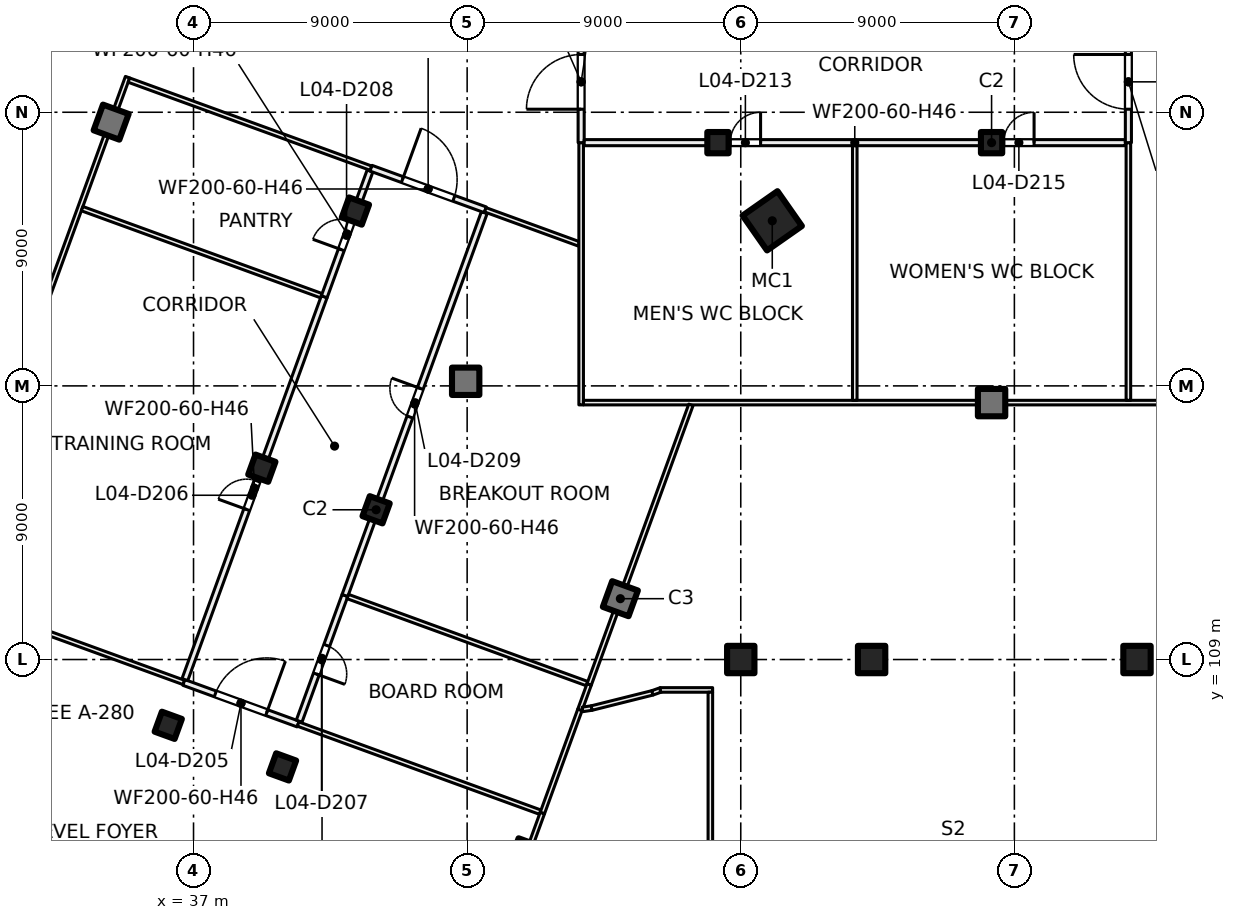
"""IFC4 building model, lengths in metres.
Left out: names, types, materials, properties, quantities, classifications, styles, units other than length and angle.
Written with IfcOpenShell. Run it as: python <this file> out.ifc"""

import sys

from ifc_helpers import new_model, si_unit, direction, frame, frame_2d, origin, origin_2d, place, context, subcontext, project, spatial, rectangle, hollow_rectangle, extrude, element, fill, save


model = new_model("IFC4")
c1 = context("Model", 3, precision=1e-05, world=origin(), true_north=direction((0.0, 1.0)))
c2 = subcontext(c1, "Body", "Model", "MODEL_VIEW")
j1 = project(units=[si_unit("LENGTHUNIT", "METRE"), si_unit("PLANEANGLEUNIT", "RADIAN")], contexts=[c1])
p1 = place(None, origin())
s1 = spatial("IfcSite", under=j1, at=p1, CompositionType="ELEMENT")
p2 = place(p1, origin())
s2 = spatial("IfcBuilding", under=s1, at=p2, CompositionType="ELEMENT")
p3 = place(p2, frame((0.0, 0.0, 22.5)))
s3 = spatial("IfcBuildingStorey", under=s2, at=p3, CompositionType="ELEMENT", Elevation=22.5)
for number, where, z_axis, x_axis in (
    (1, (55.0, 109.0, 0.0), (0.0, 0.0, 1.0), (1.0, 0.0, 0.0)),
    (2, (59.304, 109.0, 0.0), (0.0, 0.0, 1.0), (1.0, 0.0, 0.0)),
    (3, (68.033, 109.0, 0.0), (0.0, 0.0, 1.0), (1.0, 0.0, 0.0)),
):
    element("IfcColumn", number, at=place(p3, frame(where, z_axis=z_axis, x_axis=x_axis)), inside=s3, PredefinedType="COLUMN", context=c2, shape_type="SweptSolid", body=[
        extrude(rectangle(XDim=0.9, YDim=0.9, at=origin_2d()), origin(), (0.0, 0.0, 1.0), 5.0),
    ])
p4 = place(p3, frame((56.036, 123.43, 0.0), z_axis=(0.0, 0.0, 1.0), x_axis=(0.573576436351, -0.819152044289, 0.0)))
e4 = element("IfcColumn", 4, at=p4, inside=s3, PredefinedType="COLUMN", context=c2, shape_type="SweptSolid", body=[
    extrude(hollow_rectangle(XDim=1.4, YDim=1.4, WallThickness=0.04, at=origin_2d()), origin(), (0.0, 0.0, 1.0), 5.0),
])
for number, where, z_axis, x_axis in (
    (5, (54.25, 126.0, 0.0), (0.0, 0.0, 1.0), (1.0, 0.0, 0.0)),
    (6, (63.25, 126.0, 0.0), (0.0, 0.0, 1.0), (1.0, 0.0, 0.0)),
):
    element("IfcColumn", number, at=place(p3, frame(where, z_axis=z_axis, x_axis=x_axis)), inside=s3, PredefinedType="COLUMN", context=c2, shape_type="SweptSolid", body=[
        extrude(rectangle(XDim=0.7, YDim=0.7, at=origin_2d()), origin(), (0.0, 0.0, 1.0), 5.0),
    ])
for number, where, z_axis, x_axis in (
    (7, (45.952, 118.152, 0.0), (0.0, 0.0, 1.0), (1.0, 0.0, 0.0)),
    (8, (63.25, 117.45, 0.0), (0.0, 0.0, 1.0), (1.0, 0.0, 0.0)),
):
    element("IfcColumn", number, at=place(p3, frame(where, z_axis=z_axis, x_axis=x_axis)), inside=s3, PredefinedType="COLUMN", context=c2, shape_type="SweptSolid", body=[
        extrude(rectangle(XDim=0.9, YDim=0.9, at=origin_2d()), origin(), (0.0, 0.0, 1.0), 5.0),
    ])
for number, where, z_axis, x_axis in (
    (9, (43.006, 113.925, 0.0), (0.0, 0.0, 1.0), (-0.342, -0.94, 0.0)),
    (10, (39.927, 105.468, 0.0), (0.0, 0.0, 1.0), (-0.342, -0.94, 0.0)),
    (11, (42.325, 123.751, 0.0), (0.0, 0.0, 1.0), (-0.342, -0.94, 0.0)),
    (12, (39.247, 115.293, 0.0), (0.0, 0.0, 1.0), (-0.342, -0.94, 0.0)),
    (13, (36.169, 106.836, 0.0), (0.0, 0.0, 1.0), (-0.342, -0.94, 0.0)),
):
    element("IfcColumn", number, at=place(p3, frame(where, z_axis=z_axis, x_axis=x_axis)), inside=s3, PredefinedType="COLUMN", context=c2, shape_type="SweptSolid", body=[
        extrude(rectangle(XDim=0.7, YDim=0.7, at=origin_2d()), origin(), (0.0, 0.0, 1.0), 5.0),
    ])
for number, where, z_axis, x_axis in (
    (14, (51.04, 111.001, 0.0), (0.0, 0.0, 1.0), (-0.342, -0.94, 0.0)),
    (15, (47.962, 102.544, 0.0), (0.0, 0.0, 1.0), (-0.342, -0.94, 0.0)),
    (16, (34.291, 126.675, 0.0), (0.0, 0.0, 1.0), (-0.342, -0.94, 0.0)),
):
    element("IfcColumn", number, at=place(p3, frame(where, z_axis=z_axis, x_axis=x_axis)), inside=s3, PredefinedType="COLUMN", context=c2, shape_type="SweptSolid", body=[
        extrude(rectangle(XDim=0.9, YDim=0.9, at=origin_2d()), origin(), (0.0, 0.0, 1.0), 5.0),
    ])
p5 = place(p3, frame((28.647, 111.17, 0.0), z_axis=(0.0, 0.0, 1.0), x_axis=(0.342087921954, 0.939667948614, 0.0)))
e17 = element("IfcWall", 17, at=p5, inside=s3, PredefinedType="PARTITIONING", context=c2, shape_type="SweptSolid", body=[
    extrude(rectangle(XDim=18.075, YDim=0.15, at=frame_2d((9.037, 0.0))), origin(), (0.0, 0.0, 1.0), 4.625),
])
p6 = place(p3, frame((28.717, 111.144, 0.0), z_axis=(0.0, 0.0, 1.0), x_axis=(0.939731172492, -0.341914204803, 0.0)))
e18 = element("IfcWall", 18, at=p6, inside=s3, PredefinedType="PARTITIONING", context=c2, shape_type="SweptSolid", body=[
    extrude(rectangle(XDim=8.476, YDim=0.15, at=frame_2d((4.238, 0.0))), origin(), (0.0, 0.0, 1.0), 4.625),
])
p7 = place(p3, frame((33.335, 123.83, 0.0), z_axis=(0.0, 0.0, 1.0), x_axis=(0.939710837098, -0.341970090272, 0.0)))
e19 = element("IfcWall", 19, at=p7, inside=s3, PredefinedType="PARTITIONING", context=c2, shape_type="SweptSolid", body=[
    extrude(rectangle(XDim=8.375, YDim=0.15, at=frame_2d((4.188, 0.0))), origin(), (0.0, 0.0, 1.0), 4.625),
])
p8 = place(p3, frame((34.874, 128.058, 0.0), z_axis=(0.0, 0.0, 1.0), x_axis=(0.939708443164, -0.341976668571, 0.0)))
e20 = element("IfcWall", 20, at=p8, inside=s3, PredefinedType="PARTITIONING", context=c2, shape_type="SweptSolid", body=[
    extrude(rectangle(XDim=8.475, YDim=0.15, at=frame_2d((4.237, 0.0))), origin(), (0.0, 0.0, 1.0), 4.625),
])
p9 = place(p3, frame((40.44, 106.878, 0.0), z_axis=(0.0, 0.0, 1.0), x_axis=(-0.939665029144, 0.342095941228, 0.0)))
e21 = element("IfcWall", 21, at=p9, inside=s3, PredefinedType="PARTITIONING", context=c2, shape_type="SweptSolid", body=[
    extrude(rectangle(XDim=3.999, YDim=0.2, at=frame_2d((2.0, 0.0))), origin(), (0.0, 0.0, 1.0), 4.625),
])
p10 = place(p9, frame((1.099, 0.0, 0.0)))
e22 = element("IfcOpeningElement", 22, at=p10, cuts=e21, PredefinedType="OPENING", context=c2, shape_type="SweptSolid", body=[
    extrude(rectangle(XDim=1.8, YDim=2.1, at=frame_2d((0.9, 1.05))), frame((0.0, 0.11, 0.0), z_axis=(0.0, -1.0, 0.0), x_axis=(1.0, 0.0, 0.0)), (0.0, 0.0, 1.0), 0.22),
])
p11 = place(p3, frame((36.716, 108.34, 0.0), z_axis=(0.0, 0.0, 1.0), x_axis=(0.342018071111, 0.939693375008, 0.0)))
e23 = element("IfcWall", 23, at=p11, inside=s3, PredefinedType="PARTITIONING", context=c2, shape_type="SweptSolid", body=[
    extrude(rectangle(XDim=13.4, YDim=0.2, at=frame_2d((6.7, 0.0))), origin(), (0.0, 0.0, 1.0), 4.625),
])
p12 = place(p11, frame((5.952, 0.0, 0.0)))
e24 = element("IfcOpeningElement", 24, at=p12, cuts=e23, PredefinedType="OPENING", context=c2, shape_type="SweptSolid", body=[
    extrude(rectangle(XDim=1.0, YDim=2.1, at=frame_2d((0.5, 1.05))), frame((0.0, 0.11, 0.0), z_axis=(0.0, -1.0, 0.0), x_axis=(1.0, 0.0, 0.0)), (0.0, 0.0, 1.0), 0.22),
])
p13 = place(p3, frame((41.98, 111.106, 0.0), z_axis=(0.0, 0.0, 1.0), x_axis=(-0.342259834227, -0.93960534581, 0.0)))
e25 = element("IfcWall", 25, at=p13, inside=s3, PredefinedType="PARTITIONING", context=c2, shape_type="SweptSolid", body=[
    extrude(rectangle(XDim=4.4, YDim=0.2, at=frame_2d((2.2, 0.0))), origin(), (0.0, 0.0, 1.0), 4.625),
])
p14 = place(p13, frame((1.748, 0.0, 0.0)))
e26 = element("IfcOpeningElement", 26, at=p14, cuts=e25, PredefinedType="OPENING", context=c2, shape_type="SweptSolid", body=[
    extrude(rectangle(XDim=1.0, YDim=2.1, at=frame_2d((0.5, 1.05))), frame((0.0, 0.11, 0.0), z_axis=(0.0, -1.0, 0.0), x_axis=(1.0, 0.0, 0.0)), (0.0, 0.0, 1.0), 0.22),
])
p15 = place(p3, frame((40.44, 106.878, 0.0), z_axis=(0.0, 0.0, 1.0), x_axis=(0.939697516706, -0.342006691597, 0.0)))
e27 = element("IfcWall", 27, at=p15, inside=s3, PredefinedType="PARTITIONING", context=c2, shape_type="SweptSolid", body=[
    extrude(rectangle(XDim=8.476, YDim=0.15, at=frame_2d((4.238, 0.0))), origin(), (0.0, 0.0, 1.0), 4.625),
])
p16 = place(p3, frame((41.299, 120.932, 0.0), z_axis=(0.0, 0.0, 1.0), x_axis=(0.342063854115, 0.939676710208, 0.0)))
e28 = element("IfcWall", 28, at=p16, inside=s3, PredefinedType="PARTITIONING", context=c2, shape_type="SweptSolid", body=[
    extrude(rectangle(XDim=4.399, YDim=0.2, at=frame_2d((2.2, 0.0))), origin(), (0.0, 0.0, 1.0), 4.625),
])
p17 = place(p16, frame((1.648, 0.0, 0.0)))
e29 = element("IfcOpeningElement", 29, at=p17, cuts=e28, PredefinedType="OPENING", context=c2, shape_type="SweptSolid", body=[
    extrude(rectangle(XDim=1.0, YDim=2.1, at=frame_2d((0.5, 1.05))), frame((0.0, 0.11, 0.0), z_axis=(0.0, -1.0, 0.0), x_axis=(1.0, 0.0, 0.0)), (0.0, 0.0, 1.0), 0.22),
])
p18 = place(p3, frame((46.563, 123.698, 0.0), z_axis=(0.0, 0.0, 1.0), x_axis=(-0.342012215574, -0.939695506214, 0.0)))
e30 = element("IfcWall", 30, at=p18, inside=s3, PredefinedType="PARTITIONING", context=c2, shape_type="SweptSolid", body=[
    extrude(rectangle(XDim=13.4, YDim=0.2, at=frame_2d((6.7, 0.0))), origin(), (0.0, 0.0, 1.0), 4.625),
])
p19 = place(p18, frame((6.152, 0.0, 0.0)))
e31 = element("IfcOpeningElement", 31, at=p19, cuts=e30, PredefinedType="OPENING", context=c2, shape_type="SweptSolid", body=[
    extrude(rectangle(XDim=1.0, YDim=2.1, at=frame_2d((0.5, 1.05))), frame((0.0, 0.11, 0.0), z_axis=(0.0, -1.0, 0.0), x_axis=(1.0, 0.0, 0.0)), (0.0, 0.0, 1.0), 0.22),
])
p20 = place(p3, frame((42.074, 111.072, 0.0), z_axis=(0.0, 0.0, 1.0), x_axis=(0.939710837098, -0.341970090272, 0.0)))
e32 = element("IfcWall", 32, at=p20, inside=s3, PredefinedType="PARTITIONING", context=c2, shape_type="SweptSolid", body=[
    extrude(rectangle(XDim=8.375, YDim=0.15, at=frame_2d((4.188, 0.0))), origin(), (0.0, 0.0, 1.0), 4.625),
])
p21 = place(p3, frame((42.838, 125.16, 0.0), z_axis=(0.0, 0.0, 1.0), x_axis=(0.939713209288, -0.341963571582, 0.0)))
e33 = element("IfcWall", 33, at=p21, inside=s3, PredefinedType="PARTITIONING", context=c2, shape_type="SweptSolid", body=[
    extrude(rectangle(XDim=4.0, YDim=0.2, at=frame_2d((2.0, 0.0))), origin(), (0.0, 0.0, 1.0), 4.625),
])
p22 = place(p21, frame((1.1, 0.0, 0.0)))
e34 = element("IfcOpeningElement", 34, at=p22, cuts=e33, PredefinedType="OPENING", context=c2, shape_type="SweptSolid", body=[
    extrude(rectangle(XDim=1.8, YDim=2.1, at=frame_2d((0.9, 1.05))), frame((0.0, 0.11, 0.0), z_axis=(0.0, -1.0, 0.0), x_axis=(1.0, 0.0, 0.0)), (0.0, 0.0, 1.0), 0.22),
])
p23 = place(p3, frame((46.337, 98.08, 0.0), z_axis=(0.0, 0.0, 1.0), x_axis=(0.342113136459, 0.939658768842, 0.0)))
e35 = element("IfcWall", 35, at=p23, inside=s3, PredefinedType="PARTITIONING", context=c2, shape_type="SweptSolid", body=[
    extrude(rectangle(XDim=6.25, YDim=0.15, at=frame_2d((3.125, 0.0))), origin(), (0.0, 0.0, 1.0), 4.625),
])
p24 = place(p3, frame((46.597, 123.792, 0.0), z_axis=(0.0, 0.0, 1.0), x_axis=(0.939619227089, -0.342221723572, 0.0)))
e36 = element("IfcWall", 36, at=p24, inside=s3, PredefinedType="PARTITIONING", context=c2, shape_type="SweptSolid", body=[
    extrude(rectangle(XDim=3.276, YDim=0.15, at=frame_2d((1.638, 0.0))), origin(), (0.0, 0.0, 1.0), 4.625),
])
p25 = place(p3, frame((48.475, 103.953, 0.0), z_axis=(0.0, 0.0, 1.0), x_axis=(0.341992779494, 0.939702579955, 0.0)))
e37 = element("IfcWall", 37, at=p25, inside=s3, PredefinedType="PARTITIONING", context=c2, shape_type="SweptSolid", body=[
    extrude(rectangle(XDim=3.611, YDim=0.15, at=frame_2d((1.805, 0.0))), origin(), (0.0, 0.0, 1.0), 4.625),
])
p26 = place(p3, frame((49.71, 107.346, 0.0), z_axis=(0.0, 0.0, 1.0), x_axis=(0.341721024877, 0.93980143709, 0.0)))
e38 = element("IfcWall", 38, at=p26, inside=s3, PredefinedType="PARTITIONING", context=c2, shape_type="SweptSolid", body=[
    extrude(rectangle(XDim=0.889, YDim=0.15, at=frame_2d((0.445, 0.0))), origin(), (0.0, 0.0, 1.0), 4.625),
])
p27 = place(p3, frame((49.794, 107.359, 0.0), z_axis=(0.0, 0.0, 1.0), x_axis=(0.988901730308, 0.148571086668, 0.0)))
e39 = element("IfcWall", 39, at=p27, inside=s3, PredefinedType="PARTITIONING", context=c2, shape_type="SweptSolid", body=[
    extrude(rectangle(XDim=0.311, YDim=0.15, at=frame_2d((0.155, 0.0))), origin(), (0.0, 0.0, 1.0), 4.625),
])
p28 = place(p3, frame((49.75, 117.375, 0.0), z_axis=(0.0, 0.0, 1.0), x_axis=(0.0, 1.0, 0.0)))
e40 = element("IfcWall", 40, at=p28, inside=s3, PredefinedType="PARTITIONING", context=c2, shape_type="SweptSolid", body=[
    extrude(rectangle(XDim=8.625, YDim=0.15, at=frame_2d((4.312, 0.0))), origin(), (0.0, 0.0, 1.0), 4.625),
])
p29 = place(p3, frame((49.825, 117.45, 0.0), z_axis=(0.0, 0.0, 1.0), x_axis=(1.0, 0.0, 0.0)))
e41 = element("IfcWall", 41, at=p29, inside=s3, PredefinedType="PARTITIONING", context=c2, shape_type="SweptSolid", body=[
    extrude(rectangle(XDim=41.175, YDim=0.15, at=frame_2d((20.587, 0.0))), origin(), (0.0, 0.0, 1.0), 4.625),
])
p30 = place(p3, frame((49.75, 126.0, 0.0), z_axis=(0.0, 0.0, 1.0), x_axis=(0.0, 1.0, 0.0)))
e42 = element("IfcWall", 42, at=p30, inside=s3, PredefinedType="PARTITIONING", context=c2, shape_type="SweptSolid", body=[
    extrude(rectangle(XDim=4.0, YDim=0.2, at=frame_2d((2.0, 0.0))), origin(), (0.0, 0.0, 1.0), 4.625),
])
p31 = place(p30, frame((1.1, 0.0, 0.0)))
e43 = element("IfcOpeningElement", 43, at=p31, cuts=e42, PredefinedType="OPENING", context=c2, shape_type="SweptSolid", body=[
    extrude(rectangle(XDim=1.8, YDim=2.1, at=frame_2d((0.9, 1.05))), frame((0.0, 0.11, 0.0), z_axis=(0.0, -1.0, 0.0), x_axis=(1.0, 0.0, 0.0)), (0.0, 0.0, 1.0), 0.22),
])
p32 = place(p3, frame((67.65, 126.0, 0.0), z_axis=(0.0, 0.0, 1.0), x_axis=(-1.0, 0.0, 0.0)))
e44 = element("IfcWall", 44, at=p32, inside=s3, PredefinedType="PARTITIONING", context=c2, shape_type="SweptSolid", body=[
    extrude(rectangle(XDim=17.8, YDim=0.2, at=frame_2d((8.9, 0.0))), origin(), (0.0, 0.0, 1.0), 4.625),
])
p33 = place(p32, frame((11.998, 0.0, 0.0)))
e45 = element("IfcOpeningElement", 45, at=p33, cuts=e44, PredefinedType="OPENING", context=c2, shape_type="SweptSolid", body=[
    extrude(rectangle(XDim=1.0, YDim=2.1, at=frame_2d((0.5, 1.05))), frame((0.0, 0.11, 0.0), z_axis=(0.0, -1.0, 0.0), x_axis=(1.0, 0.0, 0.0)), (0.0, 0.0, 1.0), 0.22),
])
p34 = place(p32, frame((3.002, 0.0, 0.0)))
e46 = element("IfcOpeningElement", 46, at=p34, cuts=e44, PredefinedType="OPENING", context=c2, shape_type="SweptSolid", body=[
    extrude(rectangle(XDim=1.0, YDim=2.1, at=frame_2d((0.5, 1.05))), frame((0.0, 0.11, 0.0), z_axis=(0.0, -1.0, 0.0), x_axis=(1.0, 0.0, 0.0)), (0.0, 0.0, 1.0), 0.22),
])
p35 = place(p3, frame((50.014, 108.182, 0.0), z_axis=(0.0, 0.0, 1.0), x_axis=(0.342035586721, 0.939686999706, 0.0)))
e47 = element("IfcWall", 47, at=p35, inside=s3, PredefinedType="PARTITIONING", context=c2, shape_type="SweptSolid", body=[
    extrude(rectangle(XDim=9.783, YDim=0.15, at=frame_2d((4.892, 0.0))), origin(), (0.0, 0.0, 1.0), 4.625),
])
p36 = place(p3, frame((50.093, 107.403, 0.0), z_axis=(0.0, 0.0, 1.0), x_axis=(0.970121672102, 0.24261892201, 0.0)))
e48 = element("IfcWall", 48, at=p36, inside=s3, PredefinedType="PARTITIONING", context=c2, shape_type="SweptSolid", body=[
    extrude(rectangle(XDim=2.069, YDim=0.15, at=frame_2d((1.034, 0.0))), origin(), (0.0, 0.0, 1.0), 4.625),
])
p37 = place(p3, frame((52.093, 107.903, 0.0), z_axis=(0.0, 0.0, 1.0), x_axis=(0.941980718737, 0.335666986056, 0.0)))
e49 = element("IfcWall", 49, at=p37, inside=s3, PredefinedType="PARTITIONING", context=c2, shape_type="SweptSolid", body=[
    extrude(rectangle(XDim=0.3, YDim=0.15, at=frame_2d((0.15, 0.0))), origin(), (0.0, 0.0, 1.0), 4.625),
])
p38 = place(p3, frame((52.351, 108.0, 0.0), z_axis=(0.0, 0.0, 1.0), x_axis=(1.0, 0.0, 0.0)))
e50 = element("IfcWall", 50, at=p38, inside=s3, PredefinedType="PARTITIONING", context=c2, shape_type="SweptSolid", body=[
    extrude(rectangle(XDim=1.724, YDim=0.15, at=frame_2d((0.862, 0.0))), origin(), (0.0, 0.0, 1.0), 4.625),
])
p39 = place(p3, frame((54.0, 68.702, 0.0), z_axis=(0.0, 0.0, 1.0), x_axis=(0.0, 1.0, 0.0)))
e51 = element("IfcWall", 51, at=p39, inside=s3, PredefinedType="PARTITIONING", context=c2, shape_type="SweptSolid", body=[
    extrude(rectangle(XDim=39.223, YDim=0.15, at=frame_2d((19.612, 0.0))), origin(), (0.0, 0.0, 1.0), 4.625),
])
p40 = place(p3, frame((58.75, 117.525, 0.0), z_axis=(0.0, 0.0, 1.0), x_axis=(0.0, 1.0, 0.0)))
e52 = element("IfcWall", 52, at=p40, inside=s3, PredefinedType="PARTITIONING", context=c2, shape_type="SweptSolid", body=[
    extrude(rectangle(XDim=8.375, YDim=0.15, at=frame_2d((4.188, 0.0))), origin(), (0.0, 0.0, 1.0), 4.625),
])
p41 = place(p3, frame((67.75, 117.525, 0.0), z_axis=(0.0, 0.0, 1.0), x_axis=(0.0, 1.0, 0.0)))
e53 = element("IfcWall", 53, at=p41, inside=s3, PredefinedType="PARTITIONING", context=c2, shape_type="SweptSolid", body=[
    extrude(rectangle(XDim=8.475, YDim=0.15, at=frame_2d((4.238, 0.0))), origin(), (0.0, 0.0, 1.0), 4.625),
])
p42 = place(p3, frame((67.75, 130.0, 0.0), z_axis=(0.0, 0.0, 1.0), x_axis=(0.0, -1.0, 0.0)))
e54 = element("IfcWall", 54, at=p42, inside=s3, PredefinedType="PARTITIONING", context=c2, shape_type="SweptSolid", body=[
    extrude(rectangle(XDim=4.0, YDim=0.2, at=frame_2d((2.0, 0.0))), origin(), (0.0, 0.0, 1.0), 4.625),
])
p43 = place(p42, frame((1.1, 0.0, 0.0)))
e55 = element("IfcOpeningElement", 55, at=p43, cuts=e54, PredefinedType="OPENING", context=c2, shape_type="SweptSolid", body=[
    extrude(rectangle(XDim=1.8, YDim=2.1, at=frame_2d((0.9, 1.05))), frame((0.0, 0.11, 0.0), z_axis=(0.0, -1.0, 0.0), x_axis=(1.0, 0.0, 0.0)), (0.0, 0.0, 1.0), 0.22),
])
p44 = place(p10, origin())
e56 = element("IfcDoor", 56, at=p44, inside=s3, OperationType="DOUBLE_DOOR_SINGLE_SWING", PredefinedType="DOOR", context=c2, shape_type="SweptSolid", body=[
    extrude(rectangle(XDim=1.8, YDim=2.1, at=frame_2d((0.9, 1.05))), frame((0.0, 0.025, 0.0), z_axis=(0.0, -1.0, 0.0), x_axis=(1.0, 0.0, 0.0)), (0.0, 0.0, 1.0), 0.05),
])
fill(e22, e56)
p45 = place(p12, origin())
e57 = element("IfcDoor", 57, at=p45, inside=s3, OperationType="SINGLE_SWING_LEFT", PredefinedType="DOOR", context=c2, shape_type="SweptSolid", body=[
    extrude(rectangle(XDim=1.0, YDim=2.1, at=frame_2d((0.5, 1.05))), frame((0.0, 0.025, 0.0), z_axis=(0.0, -1.0, 0.0), x_axis=(1.0, 0.0, 0.0)), (0.0, 0.0, 1.0), 0.05),
])
fill(e24, e57)
p46 = place(p14, origin())
e58 = element("IfcDoor", 58, at=p46, inside=s3, OperationType="SINGLE_SWING_RIGHT", PredefinedType="DOOR", context=c2, shape_type="SweptSolid", body=[
    extrude(rectangle(XDim=1.0, YDim=2.1, at=frame_2d((0.5, 1.05))), frame((0.0, 0.025, 0.0), z_axis=(0.0, -1.0, 0.0), x_axis=(1.0, 0.0, 0.0)), (0.0, 0.0, 1.0), 0.05),
])
fill(e26, e58)
p47 = place(p17, origin())
e59 = element("IfcDoor", 59, at=p47, inside=s3, OperationType="SINGLE_SWING_LEFT", PredefinedType="DOOR", context=c2, shape_type="SweptSolid", body=[
    extrude(rectangle(XDim=1.0, YDim=2.1, at=frame_2d((0.5, 1.05))), frame((0.0, 0.025, 0.0), z_axis=(0.0, -1.0, 0.0), x_axis=(1.0, 0.0, 0.0)), (0.0, 0.0, 1.0), 0.05),
])
fill(e29, e59)
p48 = place(p19, origin())
e60 = element("IfcDoor", 60, at=p48, inside=s3, OperationType="SINGLE_SWING_LEFT", PredefinedType="DOOR", context=c2, shape_type="SweptSolid", body=[
    extrude(rectangle(XDim=1.0, YDim=2.1, at=frame_2d((0.5, 1.05))), frame((0.0, 0.025, 0.0), z_axis=(0.0, -1.0, 0.0), x_axis=(1.0, 0.0, 0.0)), (0.0, 0.0, 1.0), 0.05),
])
fill(e31, e60)
p49 = place(p22, origin())
e61 = element("IfcDoor", 61, at=p49, inside=s3, OperationType="DOUBLE_DOOR_SINGLE_SWING", PredefinedType="DOOR", context=c2, shape_type="SweptSolid", body=[
    extrude(rectangle(XDim=1.8, YDim=2.1, at=frame_2d((0.9, 1.05))), frame((0.0, 0.025, 0.0), z_axis=(0.0, -1.0, 0.0), x_axis=(1.0, 0.0, 0.0)), (0.0, 0.0, 1.0), 0.05),
])
fill(e34, e61)
p50 = place(p31, origin())
e62 = element("IfcDoor", 62, at=p50, inside=s3, OperationType="DOUBLE_DOOR_SINGLE_SWING", PredefinedType="DOOR", context=c2, shape_type="SweptSolid", body=[
    extrude(rectangle(XDim=1.8, YDim=2.1, at=frame_2d((0.9, 1.05))), frame((0.0, 0.025, 0.0), z_axis=(0.0, -1.0, 0.0), x_axis=(1.0, 0.0, 0.0)), (0.0, 0.0, 1.0), 0.05),
])
fill(e43, e62)
p51 = place(p33, origin())
e63 = element("IfcDoor", 63, at=p51, inside=s3, OperationType="SINGLE_SWING_LEFT", PredefinedType="DOOR", context=c2, shape_type="SweptSolid", body=[
    extrude(rectangle(XDim=1.0, YDim=2.1, at=frame_2d((0.5, 1.05))), frame((0.0, 0.025, 0.0), z_axis=(0.0, -1.0, 0.0), x_axis=(1.0, 0.0, 0.0)), (0.0, 0.0, 1.0), 0.05),
])
fill(e45, e63)
p52 = place(p34, origin())
e64 = element("IfcDoor", 64, at=p52, inside=s3, OperationType="SINGLE_SWING_LEFT", PredefinedType="DOOR", context=c2, shape_type="SweptSolid", body=[
    extrude(rectangle(XDim=1.0, YDim=2.1, at=frame_2d((0.5, 1.05))), frame((0.0, 0.025, 0.0), z_axis=(0.0, -1.0, 0.0), x_axis=(1.0, 0.0, 0.0)), (0.0, 0.0, 1.0), 0.05),
])
fill(e46, e64)
p53 = place(p43, origin())
e65 = element("IfcDoor", 65, at=p53, inside=s3, OperationType="DOUBLE_DOOR_SINGLE_SWING", PredefinedType="DOOR", context=c2, shape_type="SweptSolid", body=[
    extrude(rectangle(XDim=1.8, YDim=2.1, at=frame_2d((0.9, 1.05))), frame((0.0, 0.025, 0.0), z_axis=(0.0, -1.0, 0.0), x_axis=(1.0, 0.0, 0.0)), (0.0, 0.0, 1.0), 0.05),
])
fill(e55, e65)
save(model, sys.argv[1])
